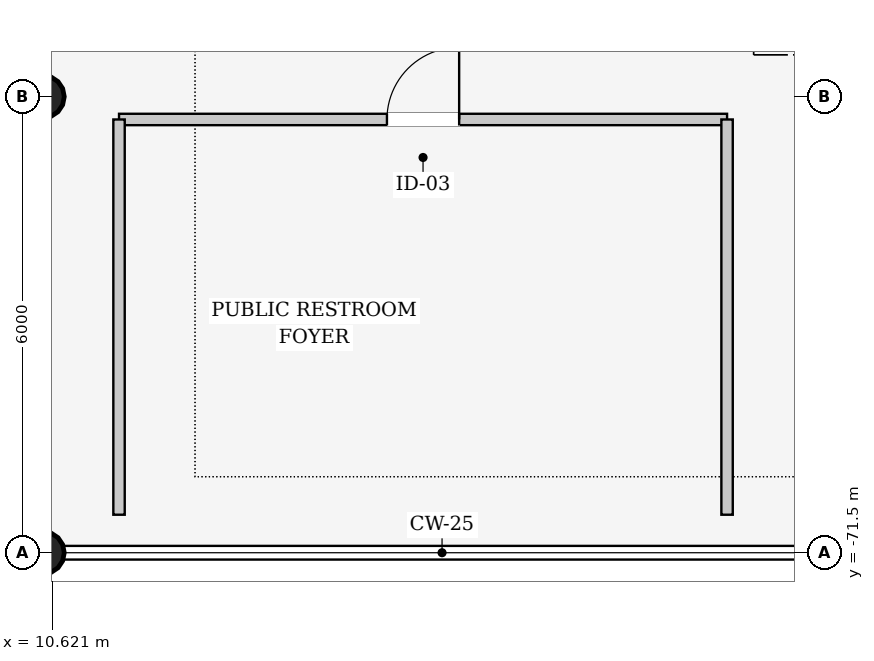
"""IFC4 building model, lengths in metres.
Left out: names, types, materials, properties, quantities, classifications, styles, units other than length and angle.
Written with IfcOpenShell. Run it as: python <this file> out.ifc"""

import sys

from ifc_helpers import new_model, si_unit, direction, frame, frame_2d, origin, origin_2d, place, context, subcontext, project, spatial, rectangle, hollow_circle, extrude, element, fill, save


model = new_model("IFC4")
c1 = context("Model", 3, precision=1e-05, world=origin(), true_north=direction((0.0, 1.0)))
c2 = subcontext(c1, "Body", "Model", "MODEL_VIEW")
j1 = project(units=[si_unit("LENGTHUNIT", "METRE"), si_unit("PLANEANGLEUNIT", "RADIAN")], contexts=[c1])
p1 = place(None, origin())
s1 = spatial("IfcSite", under=j1, at=p1, CompositionType="ELEMENT")
p2 = place(p1, origin())
s2 = spatial("IfcBuilding", under=s1, at=p2, CompositionType="ELEMENT")
p3 = place(p2, frame((0.0, 0.0, 6.0)))
s3 = spatial("IfcBuildingStorey", under=s2, at=p3, CompositionType="ELEMENT", Elevation=6.0)
for number, where, z_axis, x_axis in (
    (1, (10.5, -71.5, 0.0), (0.0, 0.0, 1.0), (1.0, 0.0, 0.0)),
    (2, (10.5, -65.5, 0.0), (0.0, 0.0, 1.0), (1.0, 0.0, 0.0)),
):
    element("IfcColumn", number, at=place(p3, frame(where, z_axis=z_axis, x_axis=x_axis)), inside=s3, PredefinedType="COLUMN", context=c2, shape_type="SweptSolid", body=[
        extrude(hollow_circle(Radius=0.28, WallThickness=0.02, at=origin_2d()), origin(), (0.0, 0.0, 1.0), 5.4),
    ])
p4 = place(p3, frame((11.5, -65.8, 0.0), z_axis=(0.0, 0.0, 1.0), x_axis=(1.0, 0.0, 0.0)))
e3 = element("IfcWall", 3, at=p4, inside=s3, PredefinedType="PARTITIONING", context=c2, shape_type="SweptSolid", body=[
    extrude(rectangle(XDim=8.0, YDim=0.15, at=frame_2d((4.0, 0.0))), origin(), (0.0, 0.0, 1.0), 4.245),
])
p5 = place(p4, frame((3.525, 0.0, 0.0)))
e4 = element("IfcOpeningElement", 4, at=p5, cuts=e3, PredefinedType="OPENING", context=c2, shape_type="SweptSolid", body=[
    extrude(rectangle(XDim=0.95, YDim=2.15, at=frame_2d((0.475, 1.075))), frame((0.0, 0.085, 0.0), z_axis=(0.0, -1.0, 0.0), x_axis=(1.0, 0.0, 0.0)), (0.0, 0.0, 1.0), 0.17),
])
for number, where, z_axis, x_axis in (
    (5, (19.5, -65.8, 0.0), (0.0, 0.0, 1.0), (0.0, -1.0, 0.0)),
    (6, (11.5, -71.0, 0.0), (0.0, 0.0, 1.0), (0.0, 1.0, 0.0)),
):
    element("IfcWall", number, at=place(p3, frame(where, z_axis=z_axis, x_axis=x_axis)), inside=s3, PredefinedType="PARTITIONING", context=c2, shape_type="SweptSolid", body=[
        extrude(rectangle(XDim=5.2, YDim=0.15, at=frame_2d((2.6, 0.0))), origin(), (0.0, 0.0, 1.0), 4.245),
    ])
p6 = place(p5, origin())
e7 = element("IfcDoor", 7, at=p6, inside=s3, OperationType="SINGLE_SWING_RIGHT", PredefinedType="DOOR", context=c2, shape_type="SweptSolid", body=[
    extrude(rectangle(XDim=0.95, YDim=2.15, at=frame_2d((0.475, 1.075))), frame((0.0, 0.025, 0.0), z_axis=(0.0, -1.0, 0.0), x_axis=(1.0, 0.0, 0.0)), (0.0, 0.0, 1.0), 0.05),
])
fill(e4, e7)
save(model, sys.argv[1])
